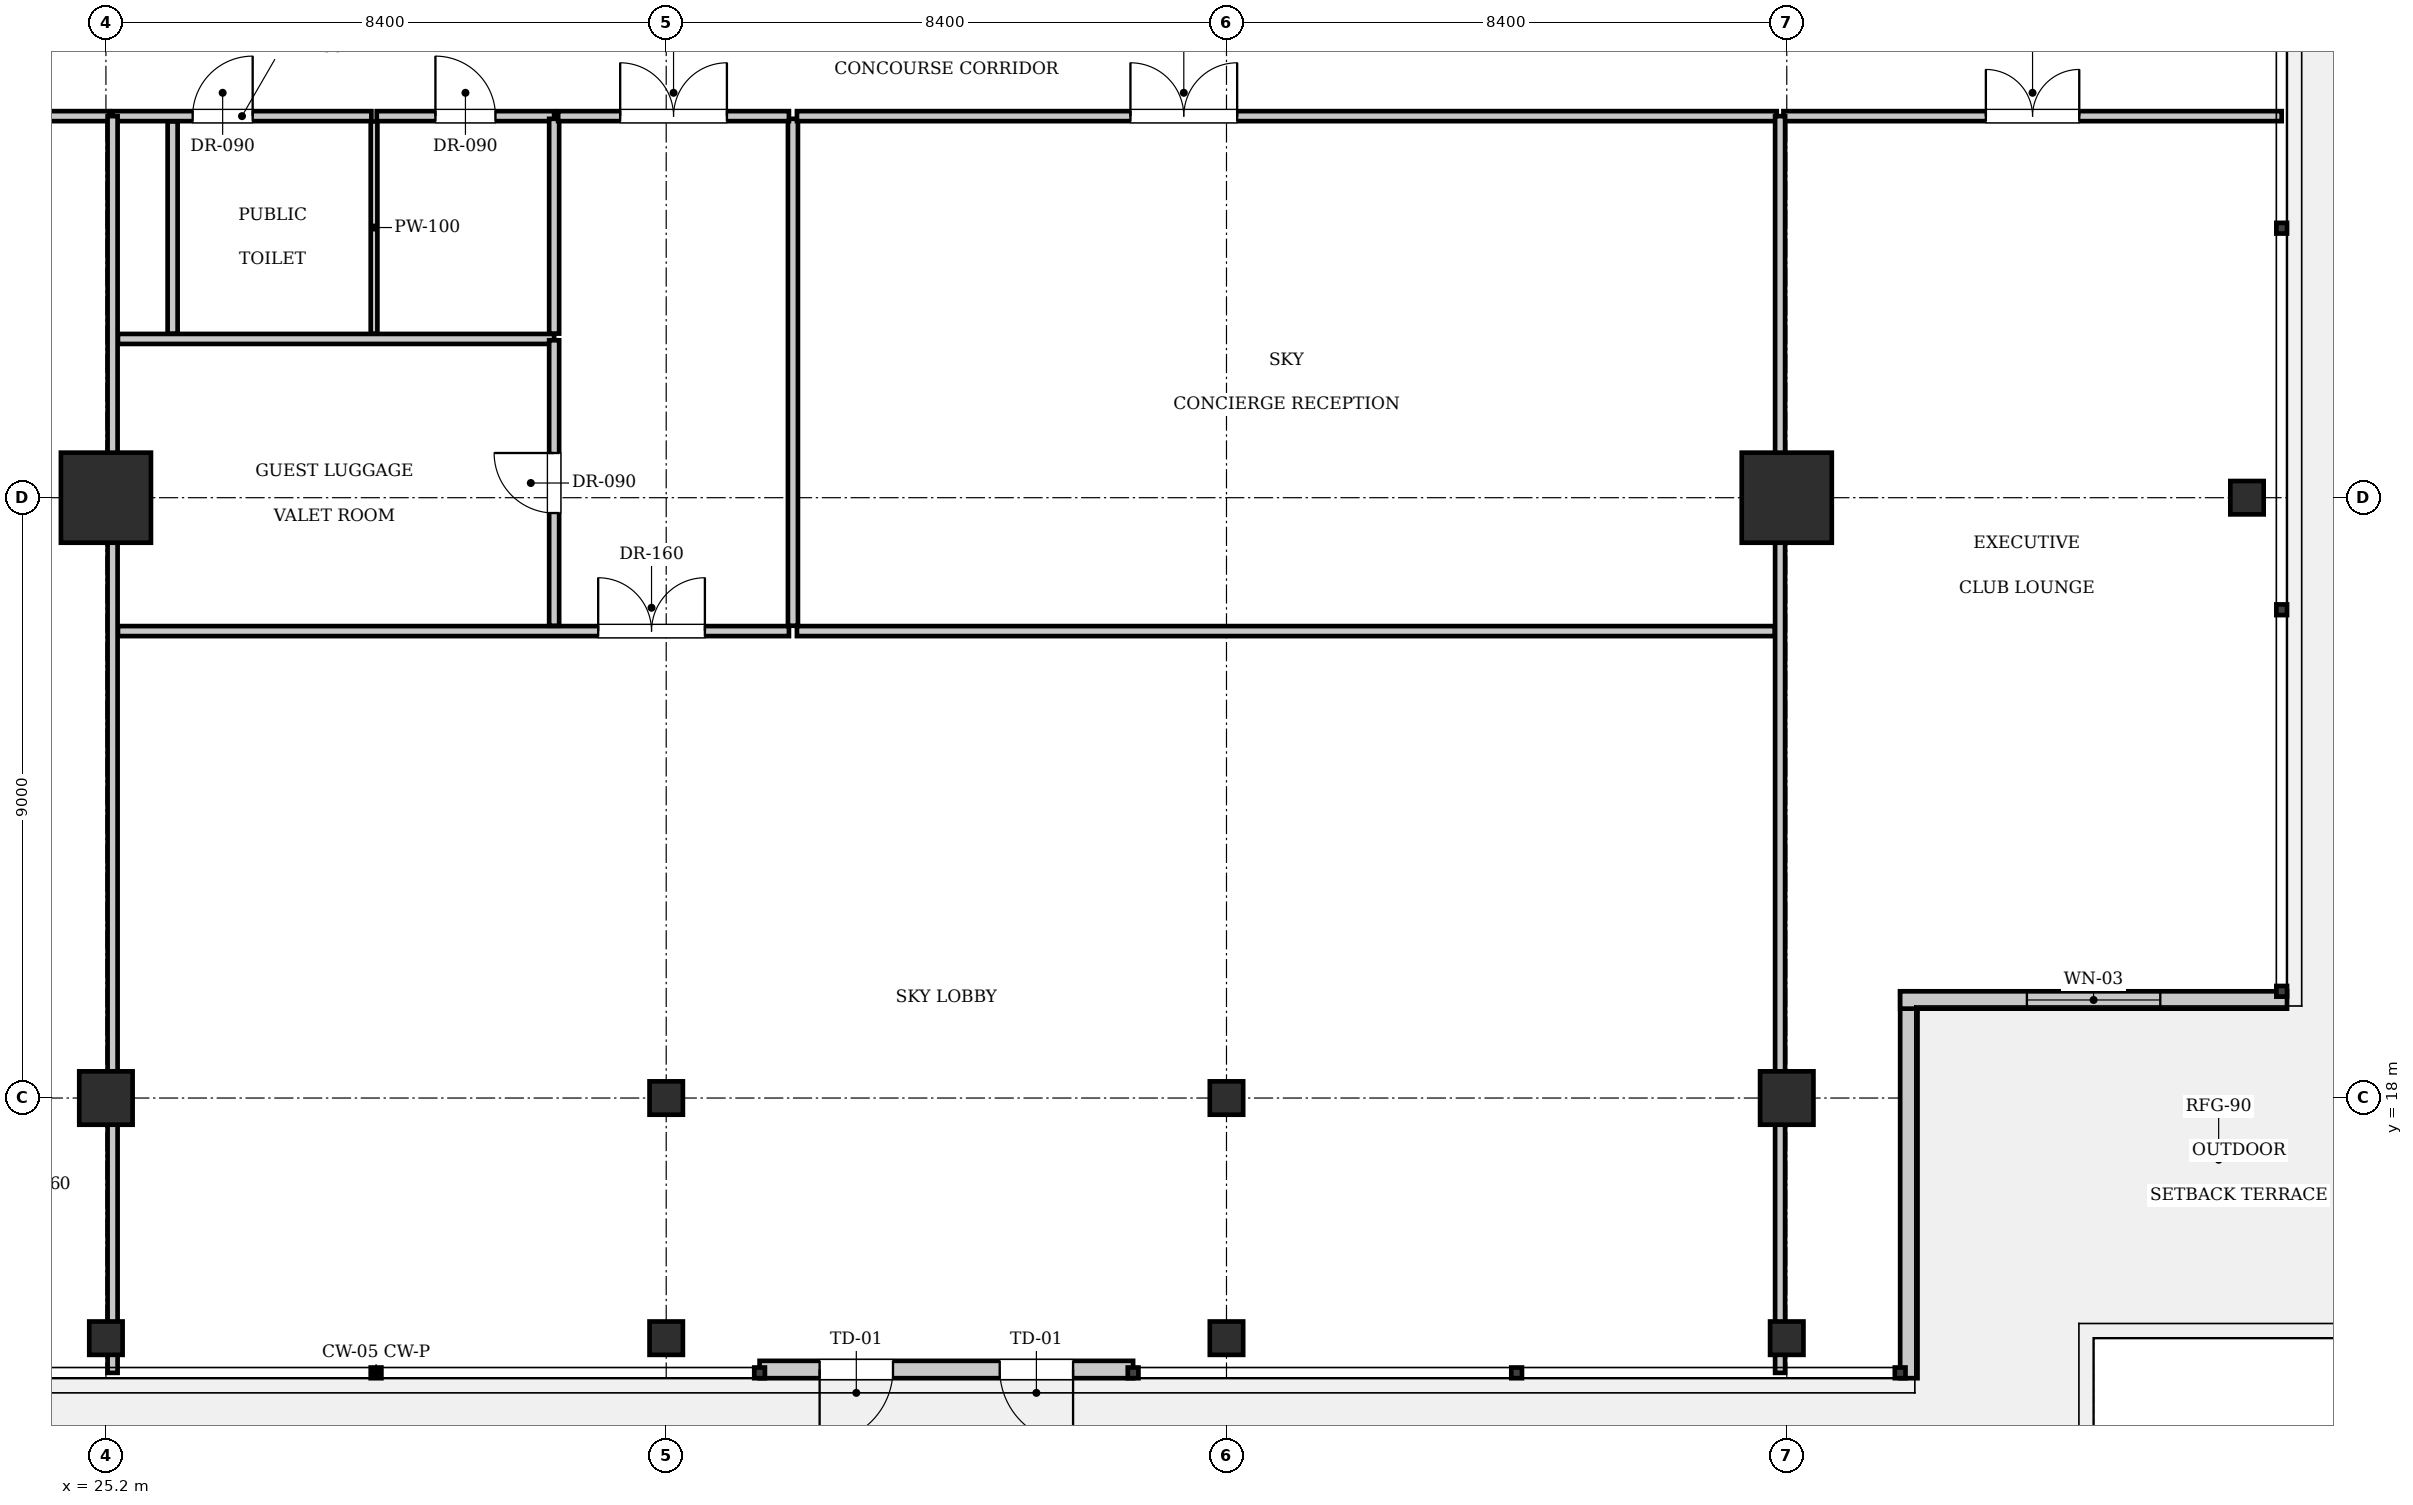
"""IFC4 building model, lengths in metres.
Left out: names, types, materials, properties, quantities, classifications, styles, units other than length and angle.
Written with IfcOpenShell. Run it as: python <this file> out.ifc"""

import sys

from ifc_helpers import new_model, si_unit, direction, frame, frame_2d, origin, origin_2d, place, context, subcontext, project, spatial, rectangle, i_section, extrude, element, fill, save


model = new_model("IFC4")
c1 = context("Model", 3, precision=1e-05, world=origin(), true_north=direction((0.0, 1.0)))
c2 = subcontext(c1, "Body", "Model", "MODEL_VIEW")
j1 = project(units=[si_unit("LENGTHUNIT", "METRE"), si_unit("PLANEANGLEUNIT", "RADIAN")], contexts=[c1])
p1 = place(None, origin())
s1 = spatial("IfcSite", under=j1, at=p1, CompositionType="ELEMENT")
p2 = place(p1, origin())
s2 = spatial("IfcBuilding", under=s1, at=p2, CompositionType="ELEMENT")
p3 = place(p2, frame((0.0, 0.0, 322.0)))
s3 = spatial("IfcBuildingStorey", under=s2, at=p3, CompositionType="ELEMENT", Elevation=322.0)
for number, where, z_axis, x_axis in (
    (1, (25.2, 27.0, 0.0), (0.0, 0.0, 1.0), (1.0, 0.0, 0.0)),
    (2, (50.4, 27.0, 0.0), (0.0, 0.0, 1.0), (1.0, 0.0, 0.0)),
):
    element("IfcColumn", number, at=place(p3, frame(where, z_axis=z_axis, x_axis=x_axis)), inside=s3, PredefinedType="COLUMN", context=c2, shape_type="SweptSolid", body=[
        extrude(rectangle(XDim=1.35, YDim=1.35, at=origin_2d()), origin(), (0.0, 0.0, 1.0), 3.85),
    ])
for number, where, z_axis, x_axis in (
    (3, (25.2, 18.0, 0.0), (0.0, 0.0, 1.0), (1.0, 0.0, 0.0)),
    (4, (50.4, 18.0, 0.0), (0.0, 0.0, 1.0), (1.0, 0.0, 0.0)),
):
    element("IfcColumn", number, at=place(p3, frame(where, z_axis=z_axis, x_axis=x_axis)), inside=s3, PredefinedType="COLUMN", context=c2, shape_type="SweptSolid", body=[
        extrude(rectangle(XDim=0.8, YDim=0.8, at=origin_2d()), origin(), (0.0, 0.0, 1.0), 3.85),
    ])
for number, where, z_axis, x_axis in (
    (5, (33.6, 18.0, 0.0), (0.0, 0.0, 1.0), (1.0, 0.0, 0.0)),
    (6, (42.0, 18.0, 0.0), (0.0, 0.0, 1.0), (1.0, 0.0, 0.0)),
):
    element("IfcColumn", number, at=place(p3, frame(where, z_axis=z_axis, x_axis=x_axis)), inside=s3, PredefinedType="COLUMN", context=c2, shape_type="SweptSolid", body=[
        extrude(i_section(OverallWidth=0.5, OverallDepth=0.5, WebThickness=0.022, FlangeThickness=0.032, at=origin_2d()), origin(), (0.0, 0.0, 1.0), 3.85),
    ])
for number, where, z_axis, x_axis in (
    (7, (57.3, 27.0, -0.24), (0.0, 0.0, 1.0), (1.0, 0.0, 0.0)),
    (8, (25.2, 14.4, -0.24), (0.0, 0.0, 1.0), (1.0, 0.0, 0.0)),
    (9, (33.6, 14.4, -0.24), (0.0, 0.0, 1.0), (1.0, 0.0, 0.0)),
    (10, (42.0, 14.4, -0.24), (0.0, 0.0, 1.0), (1.0, 0.0, 0.0)),
    (11, (50.4, 14.4, -0.24), (0.0, 0.0, 1.0), (1.0, 0.0, 0.0)),
):
    element("IfcColumn", number, at=place(p3, frame(where, z_axis=z_axis, x_axis=x_axis)), inside=s3, PredefinedType="COLUMN", context=c2, shape_type="SweptSolid", body=[
        extrude(i_section(OverallWidth=0.5, OverallDepth=0.5, WebThickness=0.022, FlangeThickness=0.032, at=origin_2d()), origin(), (0.0, 0.0, 1.0), 4.09),
    ])
p4 = place(p3, frame((52.23, 19.6, 0.0), z_axis=(0.0, 0.0, 1.0), x_axis=(0.0, -1.0, 0.0)))
e12 = element("IfcWall", 12, at=p4, inside=s3, PredefinedType="SOLIDWALL", context=c2, shape_type="SweptSolid", body=[
    extrude(rectangle(XDim=5.8, YDim=0.26, at=frame_2d((2.9, 0.0))), origin(), (0.0, 0.0, 1.0), 3.61),
])
p5 = place(p3, frame((57.9, 19.47, 0.0), z_axis=(0.0, 0.0, 1.0), x_axis=(-1.0, 0.0, 0.0)))
e13 = element("IfcWall", 13, at=p5, inside=s3, PredefinedType="SOLIDWALL", context=c2, shape_type="SweptSolid", body=[
    extrude(rectangle(XDim=5.8, YDim=0.26, at=frame_2d((2.9, 0.0))), origin(), (0.0, 0.0, 1.0), 3.61),
])
p6 = place(p5, frame((1.9, 0.0, 0.9)))
e14 = element("IfcOpeningElement", 14, at=p6, cuts=e13, PredefinedType="OPENING", context=c2, shape_type="SweptSolid", body=[
    extrude(rectangle(XDim=2.0, YDim=2.2, at=frame_2d((1.0, 1.1))), frame((0.0, 0.14, 0.0), z_axis=(0.0, -1.0, 0.0), x_axis=(1.0, 0.0, 0.0)), (0.0, 0.0, 1.0), 0.28),
])
p7 = place(p3, frame((40.6, 13.93, 0.0), z_axis=(0.0, 0.0, 1.0), x_axis=(-1.0, 0.0, 0.0)))
e15 = element("IfcWall", 15, at=p7, inside=s3, PredefinedType="SOLIDWALL", context=c2, shape_type="SweptSolid", body=[
    extrude(rectangle(XDim=5.6, YDim=0.26, at=frame_2d((2.8, 0.0))), origin(), (0.0, 0.0, 1.0), 3.61),
])
p8 = place(p7, frame((0.9, 0.0, 0.0)))
e16 = element("IfcOpeningElement", 16, at=p8, cuts=e15, PredefinedType="OPENING", context=c2, shape_type="SweptSolid", body=[
    extrude(rectangle(XDim=1.1, YDim=2.2, at=frame_2d((0.55, 1.1))), frame((0.0, 0.14, 0.0), z_axis=(0.0, -1.0, 0.0), x_axis=(1.0, 0.0, 0.0)), (0.0, 0.0, 1.0), 0.28),
])
p9 = place(p7, frame((3.6, 0.0, 0.0)))
e17 = element("IfcOpeningElement", 17, at=p9, cuts=e15, PredefinedType="OPENING", context=c2, shape_type="SweptSolid", body=[
    extrude(rectangle(XDim=1.1, YDim=2.2, at=frame_2d((0.55, 1.1))), frame((0.0, 0.14, 0.0), z_axis=(0.0, -1.0, 0.0), x_axis=(1.0, 0.0, 0.0)), (0.0, 0.0, 1.0), 0.28),
])
p10 = place(p3, frame((25.3, 32.72, 0.0), z_axis=(0.0, 0.0, 1.0), x_axis=(1.0, 0.0, 0.0)))
e18 = element("IfcWall", 18, at=p10, inside=s3, PredefinedType="PARTITIONING", context=c2, shape_type="SweptSolid", body=[
    extrude(rectangle(XDim=3.88, YDim=0.15, at=frame_2d((1.94, 0.0))), origin(), (0.0, 0.0, 1.0), 3.61),
])
p11 = place(p10, frame((1.2, 0.0, 0.0)))
e19 = element("IfcOpeningElement", 19, at=p11, cuts=e18, PredefinedType="OPENING", context=c2, shape_type="SweptSolid", body=[
    extrude(rectangle(XDim=0.9, YDim=2.1, at=frame_2d((0.45, 1.05))), frame((0.0, 0.085, 0.0), z_axis=(0.0, -1.0, 0.0), x_axis=(1.0, 0.0, 0.0)), (0.0, 0.0, 1.0), 0.17),
])
p12 = place(p3, frame((29.26, 32.72, 0.0), z_axis=(0.0, 0.0, 1.0), x_axis=(1.0, 0.0, 0.0)))
e20 = element("IfcWall", 20, at=p12, inside=s3, PredefinedType="PARTITIONING", context=c2, shape_type="SweptSolid", body=[
    extrude(rectangle(XDim=2.66, YDim=0.15, at=frame_2d((1.33, 0.0))), origin(), (0.0, 0.0, 1.0), 3.61),
])
p13 = place(p12, frame((0.88, 0.0, 0.0)))
e21 = element("IfcOpeningElement", 21, at=p13, cuts=e20, PredefinedType="OPENING", context=c2, shape_type="SweptSolid", body=[
    extrude(rectangle(XDim=0.9, YDim=2.1, at=frame_2d((0.45, 1.05))), frame((0.0, 0.085, 0.0), z_axis=(0.0, -1.0, 0.0), x_axis=(1.0, 0.0, 0.0)), (0.0, 0.0, 1.0), 0.17),
])
p14 = place(p3, frame((25.38, 29.38, 0.0), z_axis=(0.0, 0.0, 1.0), x_axis=(1.0, 0.0, 0.0)))
e22 = element("IfcWall", 22, at=p14, inside=s3, PredefinedType="PARTITIONING", context=c2, shape_type="SweptSolid", body=[
    extrude(rectangle(XDim=6.54, YDim=0.15, at=frame_2d((3.27, 0.0))), origin(), (0.0, 0.0, 1.0), 3.61),
])
p15 = place(p3, frame((26.2, 29.46, 0.0), z_axis=(0.0, 0.0, 1.0), x_axis=(0.0, 1.0, 0.0)))
e23 = element("IfcWall", 23, at=p15, inside=s3, PredefinedType="PARTITIONING", context=c2, shape_type="SweptSolid", body=[
    extrude(rectangle(XDim=3.18, YDim=0.15, at=frame_2d((1.59, 0.0))), origin(), (0.0, 0.0, 1.0), 3.61),
])
p16 = place(p3, frame((29.22, 29.46, 0.0), z_axis=(0.0, 0.0, 1.0), x_axis=(0.0, 1.0, 0.0)))
e24 = element("IfcWall", 24, at=p16, inside=s3, PredefinedType="PARTITIONING", context=c2, shape_type="SweptSolid", body=[
    extrude(rectangle(XDim=3.18, YDim=0.1, at=frame_2d((1.59, 0.0))), origin(), (0.0, 0.0, 1.0), 3.61),
])
p17 = place(p3, frame((31.92, 29.46, 0.0), z_axis=(0.0, 0.0, 1.0), x_axis=(0.0, 1.0, 0.0)))
e25 = element("IfcWall", 25, at=p17, inside=s3, PredefinedType="PARTITIONING", context=c2, shape_type="SweptSolid", body=[
    extrude(rectangle(XDim=3.22, YDim=0.15, at=frame_2d((1.61, 0.0))), origin(), (0.0, 0.0, 1.0), 3.61),
])
p18 = place(p3, frame((25.38, 25.0, 0.0), z_axis=(0.0, 0.0, 1.0), x_axis=(1.0, 0.0, 0.0)))
e26 = element("IfcWall", 26, at=p18, inside=s3, PredefinedType="PARTITIONING", context=c2, shape_type="SweptSolid", body=[
    extrude(rectangle(XDim=10.06, YDim=0.15, at=frame_2d((5.03, 0.0))), origin(), (0.0, 0.0, 1.0), 3.61),
])
p19 = place(p18, frame((7.2, 0.0, 0.0)))
e27 = element("IfcOpeningElement", 27, at=p19, cuts=e26, PredefinedType="OPENING", context=c2, shape_type="SweptSolid", body=[
    extrude(rectangle(XDim=1.6, YDim=2.3, at=frame_2d((0.8, 1.15))), frame((0.0, 0.085, 0.0), z_axis=(0.0, -1.0, 0.0), x_axis=(1.0, 0.0, 0.0)), (0.0, 0.0, 1.0), 0.17),
])
p20 = place(p3, frame((35.56, 25.0, 0.0), z_axis=(0.0, 0.0, 1.0), x_axis=(1.0, 0.0, 0.0)))
e28 = element("IfcWall", 28, at=p20, inside=s3, PredefinedType="PARTITIONING", context=c2, shape_type="SweptSolid", body=[
    extrude(rectangle(XDim=14.66, YDim=0.15, at=frame_2d((7.33, 0.0))), origin(), (0.0, 0.0, 1.0), 3.61),
])
p21 = place(p3, frame((35.5, 25.08, 0.0), z_axis=(0.0, 0.0, 1.0), x_axis=(0.0, 1.0, 0.0)))
e29 = element("IfcWall", 29, at=p21, inside=s3, PredefinedType="PARTITIONING", context=c2, shape_type="SweptSolid", body=[
    extrude(rectangle(XDim=7.6, YDim=0.15, at=frame_2d((3.8, 0.0))), origin(), (0.0, 0.0, 1.0), 3.61),
])
p22 = place(p3, frame((31.92, 25.08, 0.0), z_axis=(0.0, 0.0, 1.0), x_axis=(0.0, 1.0, 0.0)))
e30 = element("IfcWall", 30, at=p22, inside=s3, PredefinedType="PARTITIONING", context=c2, shape_type="SweptSolid", body=[
    extrude(rectangle(XDim=4.28, YDim=0.15, at=frame_2d((2.14, 0.0))), origin(), (0.0, 0.0, 1.0), 3.61),
])
p23 = place(p22, frame((1.69, 0.0, 0.0)))
e31 = element("IfcOpeningElement", 31, at=p23, cuts=e30, PredefinedType="OPENING", context=c2, shape_type="SweptSolid", body=[
    extrude(rectangle(XDim=0.9, YDim=2.1, at=frame_2d((0.45, 1.05))), frame((0.0, 0.085, 0.0), z_axis=(0.0, -1.0, 0.0), x_axis=(1.0, 0.0, 0.0)), (0.0, 0.0, 1.0), 0.17),
])
p24 = place(p3, frame((31.98, 32.72, 0.0), z_axis=(0.0, 0.0, 1.0), x_axis=(1.0, 0.0, 0.0)))
e32 = element("IfcWall", 32, at=p24, inside=s3, PredefinedType="PARTITIONING", context=c2, shape_type="SweptSolid", body=[
    extrude(rectangle(XDim=3.46, YDim=0.15, at=frame_2d((1.73, 0.0))), origin(), (0.0, 0.0, 1.0), 3.61),
])
p25 = place(p24, frame((0.93, 0.0, 0.0)))
e33 = element("IfcOpeningElement", 33, at=p25, cuts=e32, PredefinedType="OPENING", context=c2, shape_type="SweptSolid", body=[
    extrude(rectangle(XDim=1.6, YDim=2.3, at=frame_2d((0.8, 1.15))), frame((0.0, 0.085, 0.0), z_axis=(0.0, -1.0, 0.0), x_axis=(1.0, 0.0, 0.0)), (0.0, 0.0, 1.0), 0.17),
])
p26 = place(p3, frame((35.56, 32.72, 0.0), z_axis=(0.0, 0.0, 1.0), x_axis=(1.0, 0.0, 0.0)))
e34 = element("IfcWall", 34, at=p26, inside=s3, PredefinedType="PARTITIONING", context=c2, shape_type="SweptSolid", body=[
    extrude(rectangle(XDim=14.69, YDim=0.15, at=frame_2d((7.345, 0.0))), origin(), (0.0, 0.0, 1.0), 3.61),
])
p27 = place(p26, frame((5.0, 0.0, 0.0)))
e35 = element("IfcOpeningElement", 35, at=p27, cuts=e34, PredefinedType="OPENING", context=c2, shape_type="SweptSolid", body=[
    extrude(rectangle(XDim=1.6, YDim=2.3, at=frame_2d((0.8, 1.15))), frame((0.0, 0.085, 0.0), z_axis=(0.0, -1.0, 0.0), x_axis=(1.0, 0.0, 0.0)), (0.0, 0.0, 1.0), 0.17),
])
p28 = place(p3, frame((17.78, 32.72, 0.0), z_axis=(0.0, 0.0, 1.0), x_axis=(1.0, 0.0, 0.0)))
e36 = element("IfcWall", 36, at=p28, inside=s3, PredefinedType="PARTITIONING", context=c2, shape_type="SweptSolid", body=[
    extrude(rectangle(XDim=7.47, YDim=0.15, at=frame_2d((3.735, 0.0))), origin(), (0.0, 0.0, 1.0), 3.61),
])
p29 = place(p28, frame((3.035, 0.0, 0.0)))
e37 = element("IfcOpeningElement", 37, at=p29, cuts=e36, PredefinedType="OPENING", context=c2, shape_type="SweptSolid", body=[
    extrude(rectangle(XDim=1.4, YDim=2.2, at=frame_2d((0.7, 1.1))), frame((0.0, 0.085, 0.0), z_axis=(0.0, -1.0, 0.0), x_axis=(1.0, 0.0, 0.0)), (0.0, 0.0, 1.0), 0.17),
])
p30 = place(p3, frame((50.35, 32.72, 0.0), z_axis=(0.0, 0.0, 1.0), x_axis=(1.0, 0.0, 0.0)))
e38 = element("IfcWall", 38, at=p30, inside=s3, PredefinedType="PARTITIONING", context=c2, shape_type="SweptSolid", body=[
    extrude(rectangle(XDim=7.47, YDim=0.15, at=frame_2d((3.735, 0.0))), origin(), (0.0, 0.0, 1.0), 3.61),
])
p31 = place(p30, frame((3.035, 0.0, 0.0)))
e39 = element("IfcOpeningElement", 39, at=p31, cuts=e38, PredefinedType="OPENING", context=c2, shape_type="SweptSolid", body=[
    extrude(rectangle(XDim=1.4, YDim=2.2, at=frame_2d((0.7, 1.1))), frame((0.0, 0.085, 0.0), z_axis=(0.0, -1.0, 0.0), x_axis=(1.0, 0.0, 0.0)), (0.0, 0.0, 1.0), 0.17),
])
for number, where, z_axis, x_axis in (
    (40, (25.3, 13.88, 0.0), (0.0, 0.0, 1.0), (0.0, 1.0, 0.0)),
    (41, (50.3, 13.88, 0.0), (0.0, 0.0, 1.0), (0.0, 1.0, 0.0)),
):
    element("IfcWall", number, at=place(p3, frame(where, z_axis=z_axis, x_axis=x_axis)), inside=s3, PredefinedType="PARTITIONING", context=c2, shape_type="SweptSolid", body=[
        extrude(rectangle(XDim=18.84, YDim=0.15, at=frame_2d((9.42, 0.0))), origin(), (0.0, 0.0, 1.0), 3.141),
    ])
p32 = place(p6, origin())
e42 = element("IfcWindow", 42, at=p32, inside=s3, PartitioningType="SINGLE_PANEL", PredefinedType="WINDOW", context=c2, shape_type="SweptSolid", body=[
    extrude(rectangle(XDim=2.0, YDim=2.2, at=frame_2d((1.0, 1.1))), frame((0.0, 0.03, 0.0), z_axis=(0.0, -1.0, 0.0), x_axis=(1.0, 0.0, 0.0)), (0.0, 0.0, 1.0), 0.06),
])
fill(e14, e42)
p33 = place(p8, origin())
e43 = element("IfcDoor", 43, at=p33, inside=s3, OperationType="SINGLE_SWING_LEFT", PredefinedType="DOOR", context=c2, shape_type="SweptSolid", body=[
    extrude(rectangle(XDim=1.1, YDim=2.2, at=frame_2d((0.55, 1.1))), frame((0.0, 0.025, 0.0), z_axis=(0.0, -1.0, 0.0), x_axis=(1.0, 0.0, 0.0)), (0.0, 0.0, 1.0), 0.05),
])
fill(e16, e43)
p34 = place(p9, origin())
e44 = element("IfcDoor", 44, at=p34, inside=s3, OperationType="SINGLE_SWING_RIGHT", PredefinedType="DOOR", context=c2, shape_type="SweptSolid", body=[
    extrude(rectangle(XDim=1.1, YDim=2.2, at=frame_2d((0.55, 1.1))), frame((0.0, 0.025, 0.0), z_axis=(0.0, -1.0, 0.0), x_axis=(1.0, 0.0, 0.0)), (0.0, 0.0, 1.0), 0.05),
])
fill(e17, e44)
p35 = place(p11, origin())
e45 = element("IfcDoor", 45, at=p35, inside=s3, OperationType="SINGLE_SWING_RIGHT", PredefinedType="DOOR", context=c2, shape_type="SweptSolid", body=[
    extrude(rectangle(XDim=0.9, YDim=2.1, at=frame_2d((0.45, 1.05))), frame((0.0, 0.025, 0.0), z_axis=(0.0, -1.0, 0.0), x_axis=(1.0, 0.0, 0.0)), (0.0, 0.0, 1.0), 0.05),
])
fill(e19, e45)
p36 = place(p13, origin())
e46 = element("IfcDoor", 46, at=p36, inside=s3, OperationType="SINGLE_SWING_LEFT", PredefinedType="DOOR", context=c2, shape_type="SweptSolid", body=[
    extrude(rectangle(XDim=0.9, YDim=2.1, at=frame_2d((0.45, 1.05))), frame((0.0, 0.025, 0.0), z_axis=(0.0, -1.0, 0.0), x_axis=(1.0, 0.0, 0.0)), (0.0, 0.0, 1.0), 0.05),
])
fill(e21, e46)
p37 = place(p19, origin())
e47 = element("IfcDoor", 47, at=p37, inside=s3, OperationType="DOUBLE_DOOR_SINGLE_SWING", PredefinedType="DOOR", context=c2, shape_type="SweptSolid", body=[
    extrude(rectangle(XDim=1.6, YDim=2.3, at=frame_2d((0.8, 1.15))), frame((0.0, 0.025, 0.0), z_axis=(0.0, -1.0, 0.0), x_axis=(1.0, 0.0, 0.0)), (0.0, 0.0, 1.0), 0.05),
])
fill(e27, e47)
p38 = place(p25, origin())
e48 = element("IfcDoor", 48, at=p38, inside=s3, OperationType="DOUBLE_DOOR_SINGLE_SWING", PredefinedType="DOOR", context=c2, shape_type="SweptSolid", body=[
    extrude(rectangle(XDim=1.6, YDim=2.3, at=frame_2d((0.8, 1.15))), frame((0.0, 0.025, 0.0), z_axis=(0.0, -1.0, 0.0), x_axis=(1.0, 0.0, 0.0)), (0.0, 0.0, 1.0), 0.05),
])
fill(e33, e48)
p39 = place(p23, origin())
e49 = element("IfcDoor", 49, at=p39, inside=s3, OperationType="SINGLE_SWING_RIGHT", PredefinedType="DOOR", context=c2, shape_type="SweptSolid", body=[
    extrude(rectangle(XDim=0.9, YDim=2.1, at=frame_2d((0.45, 1.05))), frame((0.0, 0.025, 0.0), z_axis=(0.0, -1.0, 0.0), x_axis=(1.0, 0.0, 0.0)), (0.0, 0.0, 1.0), 0.05),
])
fill(e31, e49)
p40 = place(p27, origin())
e50 = element("IfcDoor", 50, at=p40, inside=s3, OperationType="DOUBLE_DOOR_SINGLE_SWING", PredefinedType="DOOR", context=c2, shape_type="SweptSolid", body=[
    extrude(rectangle(XDim=1.6, YDim=2.3, at=frame_2d((0.8, 1.15))), frame((0.0, 0.025, 0.0), z_axis=(0.0, -1.0, 0.0), x_axis=(1.0, 0.0, 0.0)), (0.0, 0.0, 1.0), 0.05),
])
fill(e35, e50)
p41 = place(p31, origin())
e51 = element("IfcDoor", 51, at=p41, inside=s3, OperationType="DOUBLE_DOOR_SINGLE_SWING", PredefinedType="DOOR", context=c2, shape_type="SweptSolid", body=[
    extrude(rectangle(XDim=1.4, YDim=2.2, at=frame_2d((0.7, 1.1))), frame((0.0, 0.025, 0.0), z_axis=(0.0, -1.0, 0.0), x_axis=(1.0, 0.0, 0.0)), (0.0, 0.0, 1.0), 0.05),
])
fill(e39, e51)
save(model, sys.argv[1])
